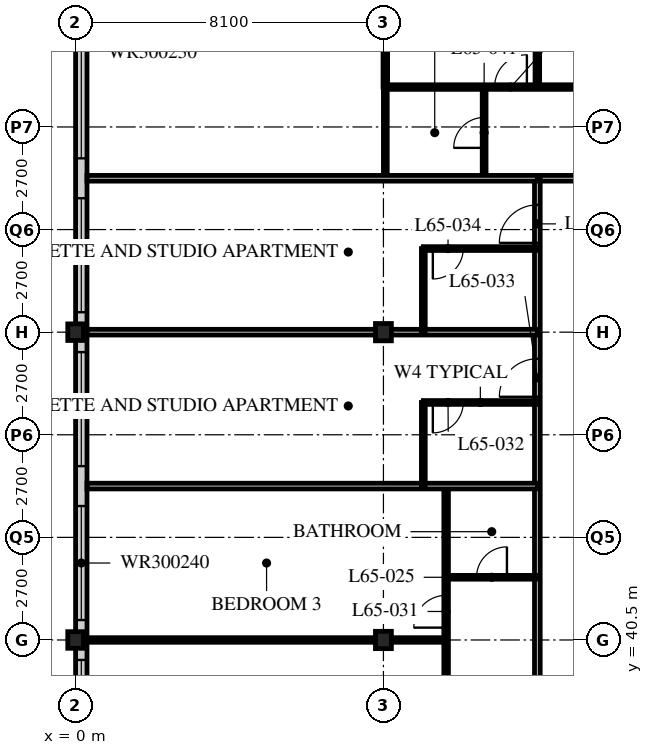
"""IFC4 building model, lengths in metres.
Left out: names, types, materials, properties, quantities, classifications, styles, units other than length and angle.
Written with IfcOpenShell. Run it as: python <this file> out.ifc"""

import sys

from ifc_helpers import new_model, si_unit, direction, frame, frame_2d, origin, origin_2d, place, context, subcontext, project, spatial, rectangle, i_section, extrude, element, fill, save


model = new_model("IFC4")
c1 = context("Model", 3, precision=1e-05, world=origin(), true_north=direction((0.0, 1.0)))
c2 = subcontext(c1, "Body", "Model", "MODEL_VIEW")
j1 = project(units=[si_unit("LENGTHUNIT", "METRE"), si_unit("PLANEANGLEUNIT", "RADIAN")], contexts=[c1])
p1 = place(None, origin())
s1 = spatial("IfcSite", under=j1, at=p1, CompositionType="ELEMENT")
p2 = place(p1, origin())
s2 = spatial("IfcBuilding", under=s1, at=p2, CompositionType="ELEMENT")
p3 = place(p2, frame((0.0, 0.0, 254.1)))
s3 = spatial("IfcBuildingStorey", under=s2, at=p3, CompositionType="ELEMENT", Elevation=254.1)
for number, where, z_axis, x_axis in (
    (1, (0.0, 40.5, 0.0), (0.0, 0.0, 1.0), (1.0, 0.0, 0.0)),
    (2, (0.0, 48.6, 0.0), (0.0, 0.0, 1.0), (1.0, 0.0, 0.0)),
):
    element("IfcColumn", number, at=place(p3, frame(where, z_axis=z_axis, x_axis=x_axis)), inside=s3, PredefinedType="COLUMN", context=c2, shape_type="SweptSolid", body=[
        extrude(i_section(OverallWidth=0.412, OverallDepth=0.437, WebThickness=0.036, FlangeThickness=0.058, FilletRadius=0.015, at=origin_2d()), origin(), (0.0, 0.0, 1.0), 3.9),
    ])
for number, where, z_axis, x_axis in (
    (3, (8.1, 40.5, 0.0), (0.0, 0.0, 1.0), (1.0, 0.0, 0.0)),
    (4, (8.1, 48.6, 0.0), (0.0, 0.0, 1.0), (1.0, 0.0, 0.0)),
):
    element("IfcColumn", number, at=place(p3, frame(where, z_axis=z_axis, x_axis=x_axis)), inside=s3, PredefinedType="COLUMN", context=c2, shape_type="SweptSolid", body=[
        extrude(i_section(OverallWidth=0.418, OverallDepth=0.456, WebThickness=0.042, FlangeThickness=0.067, FilletRadius=0.015, at=origin_2d()), origin(), (0.0, 0.0, 1.0), 3.9),
    ])
p4 = place(p3, frame((0.15, 56.4, 0.0), z_axis=(0.0, 0.0, 1.0), x_axis=(0.0, -1.0, 0.0)))
e5 = element("IfcWall", 5, at=p4, inside=s3, PredefinedType="SOLIDWALL", context=c2, shape_type="SweptSolid", body=[
    extrude(rectangle(XDim=32.1, YDim=0.3, at=frame_2d((16.05, 0.0))), origin(), (0.0, 0.0, 1.0), 3.69),
])
p5 = place(p4, frame((0.225, 0.0, 0.6)))
e6 = element("IfcOpeningElement", 6, at=p5, cuts=e5, PredefinedType="OPENING", context=c2, shape_type="SweptSolid", body=[
    extrude(rectangle(XDim=3.0, YDim=2.4, at=frame_2d((1.5, 1.2))), frame((0.0, 0.16, 0.0), z_axis=(0.0, -1.0, 0.0), x_axis=(1.0, 0.0, 0.0)), (0.0, 0.0, 1.0), 0.32),
])
p6 = place(p4, frame((4.275, 0.0, 0.6)))
e7 = element("IfcOpeningElement", 7, at=p6, cuts=e5, PredefinedType="OPENING", context=c2, shape_type="SweptSolid", body=[
    extrude(rectangle(XDim=3.0, YDim=2.4, at=frame_2d((1.5, 1.2))), frame((0.0, 0.16, 0.0), z_axis=(0.0, -1.0, 0.0), x_axis=(1.0, 0.0, 0.0)), (0.0, 0.0, 1.0), 0.32),
])
p7 = place(p4, frame((8.325, 0.0, 0.6)))
e8 = element("IfcOpeningElement", 8, at=p7, cuts=e5, PredefinedType="OPENING", context=c2, shape_type="SweptSolid", body=[
    extrude(rectangle(XDim=3.0, YDim=2.4, at=frame_2d((1.5, 1.2))), frame((0.0, 0.16, 0.0), z_axis=(0.0, -1.0, 0.0), x_axis=(1.0, 0.0, 0.0)), (0.0, 0.0, 1.0), 0.32),
])
p8 = place(p4, frame((12.375, 0.0, 0.6)))
e9 = element("IfcOpeningElement", 9, at=p8, cuts=e5, PredefinedType="OPENING", context=c2, shape_type="SweptSolid", body=[
    extrude(rectangle(XDim=3.0, YDim=2.4, at=frame_2d((1.5, 1.2))), frame((0.0, 0.16, 0.0), z_axis=(0.0, -1.0, 0.0), x_axis=(1.0, 0.0, 0.0)), (0.0, 0.0, 1.0), 0.32),
])
p9 = place(p4, frame((16.425, 0.0, 0.6)))
e10 = element("IfcOpeningElement", 10, at=p9, cuts=e5, PredefinedType="OPENING", context=c2, shape_type="SweptSolid", body=[
    extrude(rectangle(XDim=3.0, YDim=2.4, at=frame_2d((1.5, 1.2))), frame((0.0, 0.16, 0.0), z_axis=(0.0, -1.0, 0.0), x_axis=(1.0, 0.0, 0.0)), (0.0, 0.0, 1.0), 0.32),
])
p10 = place(p4, frame((20.475, 0.0, 0.6)))
e11 = element("IfcOpeningElement", 11, at=p10, cuts=e5, PredefinedType="OPENING", context=c2, shape_type="SweptSolid", body=[
    extrude(rectangle(XDim=3.0, YDim=2.4, at=frame_2d((1.5, 1.2))), frame((0.0, 0.16, 0.0), z_axis=(0.0, -1.0, 0.0), x_axis=(1.0, 0.0, 0.0)), (0.0, 0.0, 1.0), 0.32),
])
p11 = place(p4, frame((24.525, 0.0, 0.6)))
e12 = element("IfcOpeningElement", 12, at=p11, cuts=e5, PredefinedType="OPENING", context=c2, shape_type="SweptSolid", body=[
    extrude(rectangle(XDim=3.0, YDim=2.4, at=frame_2d((1.5, 1.2))), frame((0.0, 0.16, 0.0), z_axis=(0.0, -1.0, 0.0), x_axis=(1.0, 0.0, 0.0)), (0.0, 0.0, 1.0), 0.32),
])
p12 = place(p4, frame((28.575, 0.0, 0.6)))
e13 = element("IfcOpeningElement", 13, at=p12, cuts=e5, PredefinedType="OPENING", context=c2, shape_type="SweptSolid", body=[
    extrude(rectangle(XDim=3.0, YDim=2.4, at=frame_2d((1.5, 1.2))), frame((0.0, 0.16, 0.0), z_axis=(0.0, -1.0, 0.0), x_axis=(1.0, 0.0, 0.0)), (0.0, 0.0, 1.0), 0.32),
])
p13 = place(p3, frame((12.15, 52.65, 0.0), z_axis=(0.0, 0.0, 1.0), x_axis=(1.0, 0.0, 0.0)))
e14 = element("IfcWall", 14, at=p13, inside=s3, PredefinedType="PARTITIONING", context=c2, shape_type="SweptSolid", body=[
    extrude(rectangle(XDim=24.3, YDim=0.15, at=frame_2d((12.15, 0.0))), origin(), (0.0, 0.0, 1.0), 3.69),
])
p14 = place(p13, frame((4.45, 0.0, 0.0)))
e15 = element("IfcOpeningElement", 15, at=p14, cuts=e14, PredefinedType="OPENING", context=c2, shape_type="SweptSolid", body=[
    extrude(rectangle(XDim=1.0, YDim=2.1, at=frame_2d((0.5, 1.05))), frame((0.0, 0.085, 0.0), z_axis=(0.0, -1.0, 0.0), x_axis=(1.0, 0.0, 0.0)), (0.0, 0.0, 1.0), 0.17),
])
p15 = place(p13, frame((1.525, 0.0, 0.0)))
e16 = element("IfcOpeningElement", 16, at=p15, cuts=e14, PredefinedType="OPENING", context=c2, shape_type="SweptSolid", body=[
    extrude(rectangle(XDim=1.0, YDim=2.1, at=frame_2d((0.5, 1.05))), frame((0.0, 0.085, 0.0), z_axis=(0.0, -1.0, 0.0), x_axis=(1.0, 0.0, 0.0)), (0.0, 0.0, 1.0), 0.17),
])
p16 = place(p3, frame((12.15, 22.5, 0.0), z_axis=(0.0, 0.0, 1.0), x_axis=(0.0, 1.0, 0.0)))
e17 = element("IfcWall", 17, at=p16, inside=s3, PredefinedType="PARTITIONING", context=c2, shape_type="SweptSolid", body=[
    extrude(rectangle(XDim=30.15, YDim=0.15, at=frame_2d((15.075, 0.0))), origin(), (0.0, 0.0, 1.0), 3.69),
])
p17 = place(p16, frame((0.4, 0.0, 0.0)))
e18 = element("IfcOpeningElement", 18, at=p17, cuts=e17, PredefinedType="OPENING", context=c2, shape_type="SweptSolid", body=[
    extrude(rectangle(XDim=1.0, YDim=2.1, at=frame_2d((0.5, 1.05))), frame((0.0, 0.085, 0.0), z_axis=(0.0, -1.0, 0.0), x_axis=(1.0, 0.0, 0.0)), (0.0, 0.0, 1.0), 0.17),
])
p18 = place(p16, frame((24.4, 0.0, 0.0)))
e19 = element("IfcOpeningElement", 19, at=p18, cuts=e17, PredefinedType="OPENING", context=c2, shape_type="SweptSolid", body=[
    extrude(rectangle(XDim=1.0, YDim=2.1, at=frame_2d((0.5, 1.05))), frame((0.0, 0.085, 0.0), z_axis=(0.0, -1.0, 0.0), x_axis=(1.0, 0.0, 0.0)), (0.0, 0.0, 1.0), 0.17),
])
p19 = place(p16, frame((28.45, 0.0, 0.0)))
e20 = element("IfcOpeningElement", 20, at=p19, cuts=e17, PredefinedType="OPENING", context=c2, shape_type="SweptSolid", body=[
    extrude(rectangle(XDim=1.0, YDim=2.1, at=frame_2d((0.5, 1.05))), frame((0.0, 0.085, 0.0), z_axis=(0.0, -1.0, 0.0), x_axis=(1.0, 0.0, 0.0)), (0.0, 0.0, 1.0), 0.17),
])
p20 = place(p3, frame((9.75, 22.5, 0.0), z_axis=(0.0, 0.0, 1.0), x_axis=(0.0, 1.0, 0.0)))
e21 = element("IfcWall", 21, at=p20, inside=s3, PredefinedType="PARTITIONING", context=c2, shape_type="SweptSolid", body=[
    extrude(rectangle(XDim=22.05, YDim=0.12, at=frame_2d((11.025, 0.0))), origin(), (0.0, 0.0, 1.0), 3.69),
])
p21 = place(p20, frame((0.975, 0.0, 0.0)))
e22 = element("IfcOpeningElement", 22, at=p21, cuts=e21, PredefinedType="OPENING", context=c2, shape_type="SweptSolid", body=[
    extrude(rectangle(XDim=0.85, YDim=2.1, at=frame_2d((0.425, 1.05))), frame((0.0, 0.07, 0.0), z_axis=(0.0, -1.0, 0.0), x_axis=(1.0, 0.0, 0.0)), (0.0, 0.0, 1.0), 0.14),
])
p22 = place(p20, frame((10.225, 0.0, 0.0)))
e23 = element("IfcOpeningElement", 23, at=p22, cuts=e21, PredefinedType="OPENING", context=c2, shape_type="SweptSolid", body=[
    extrude(rectangle(XDim=0.85, YDim=2.1, at=frame_2d((0.425, 1.05))), frame((0.0, 0.07, 0.0), z_axis=(0.0, -1.0, 0.0), x_axis=(1.0, 0.0, 0.0)), (0.0, 0.0, 1.0), 0.14),
])
p23 = place(p20, frame((14.275, 0.0, 0.0)))
e24 = element("IfcOpeningElement", 24, at=p23, cuts=e21, PredefinedType="OPENING", context=c2, shape_type="SweptSolid", body=[
    extrude(rectangle(XDim=0.85, YDim=2.1, at=frame_2d((0.425, 1.05))), frame((0.0, 0.07, 0.0), z_axis=(0.0, -1.0, 0.0), x_axis=(1.0, 0.0, 0.0)), (0.0, 0.0, 1.0), 0.14),
])
p24 = place(p20, frame((18.325, 0.0, 0.0)))
e25 = element("IfcOpeningElement", 25, at=p24, cuts=e21, PredefinedType="OPENING", context=c2, shape_type="SweptSolid", body=[
    extrude(rectangle(XDim=0.85, YDim=2.1, at=frame_2d((0.425, 1.05))), frame((0.0, 0.07, 0.0), z_axis=(0.0, -1.0, 0.0), x_axis=(1.0, 0.0, 0.0)), (0.0, 0.0, 1.0), 0.14),
])
p25 = place(p3, frame((12.15, 42.15, 0.0), z_axis=(0.0, 0.0, 1.0), x_axis=(-1.0, 0.0, 0.0)))
e26 = element("IfcWall", 26, at=p25, inside=s3, PredefinedType="PARTITIONING", context=c2, shape_type="SweptSolid", body=[
    extrude(rectangle(XDim=2.4, YDim=0.1, at=frame_2d((1.2, 0.0))), origin(), (0.0, 0.0, 1.0), 3.69),
])
p26 = place(p25, frame((0.8, 0.0, 0.0)))
e27 = element("IfcOpeningElement", 27, at=p26, cuts=e26, PredefinedType="OPENING", context=c2, shape_type="SweptSolid", body=[
    extrude(rectangle(XDim=0.8, YDim=2.1, at=frame_2d((0.4, 1.05))), frame((0.0, 0.06, 0.0), z_axis=(0.0, -1.0, 0.0), x_axis=(1.0, 0.0, 0.0)), (0.0, 0.0, 1.0), 0.12),
])
p27 = place(p3, frame((9.75, 40.5, 0.0), z_axis=(0.0, 0.0, 1.0), x_axis=(-1.0, 0.0, 0.0)))
e28 = element("IfcWall", 28, at=p27, inside=s3, PredefinedType="PARTITIONING", context=c2, shape_type="SweptSolid", body=[
    extrude(rectangle(XDim=9.45, YDim=0.12, at=frame_2d((4.725, 0.0))), origin(), (0.0, 0.0, 1.0), 3.078),
])
p28 = place(p3, frame((12.15, 44.55, 0.0), z_axis=(0.0, 0.0, 1.0), x_axis=(-1.0, 0.0, 0.0)))
e29 = element("IfcWall", 29, at=p28, inside=s3, PredefinedType="PARTITIONING", context=c2, shape_type="SweptSolid", body=[
    extrude(rectangle(XDim=11.85, YDim=0.15, at=frame_2d((5.925, 0.0))), origin(), (0.0, 0.0, 1.0), 3.69),
])
p29 = place(p3, frame((9.15, 44.55, 0.0), z_axis=(0.0, 0.0, 1.0), x_axis=(0.0, 1.0, 0.0)))
e30 = element("IfcWall", 30, at=p29, inside=s3, PredefinedType="PARTITIONING", context=c2, shape_type="SweptSolid", body=[
    extrude(rectangle(XDim=2.2, YDim=0.1, at=frame_2d((1.1, 0.0))), origin(), (0.0, 0.0, 1.0), 3.69),
])
p30 = place(p3, frame((12.15, 46.75, 0.0), z_axis=(0.0, 0.0, 1.0), x_axis=(-1.0, 0.0, 0.0)))
e31 = element("IfcWall", 31, at=p30, inside=s3, PredefinedType="PARTITIONING", context=c2, shape_type="SweptSolid", body=[
    extrude(rectangle(XDim=3.0, YDim=0.1, at=frame_2d((1.5, 0.0))), origin(), (0.0, 0.0, 1.0), 3.69),
])
p31 = place(p30, frame((1.95, 0.0, 0.0)))
e32 = element("IfcOpeningElement", 32, at=p31, cuts=e31, PredefinedType="OPENING", context=c2, shape_type="SweptSolid", body=[
    extrude(rectangle(XDim=0.8, YDim=2.1, at=frame_2d((0.4, 1.05))), frame((0.0, 0.06, 0.0), z_axis=(0.0, -1.0, 0.0), x_axis=(1.0, 0.0, 0.0)), (0.0, 0.0, 1.0), 0.12),
])
p32 = place(p3, frame((12.15, 48.6, 0.0), z_axis=(0.0, 0.0, 1.0), x_axis=(-1.0, 0.0, 0.0)))
e33 = element("IfcWall", 33, at=p32, inside=s3, PredefinedType="PARTITIONING", context=c2, shape_type="SweptSolid", body=[
    extrude(rectangle(XDim=11.85, YDim=0.15, at=frame_2d((5.925, 0.0))), origin(), (0.0, 0.0, 1.0), 3.078),
])
p33 = place(p3, frame((9.15, 48.6, 0.0), z_axis=(0.0, 0.0, 1.0), x_axis=(0.0, 1.0, 0.0)))
e34 = element("IfcWall", 34, at=p33, inside=s3, PredefinedType="PARTITIONING", context=c2, shape_type="SweptSolid", body=[
    extrude(rectangle(XDim=2.2, YDim=0.1, at=frame_2d((1.1, 0.0))), origin(), (0.0, 0.0, 1.0), 3.69),
])
p34 = place(p3, frame((12.15, 50.8, 0.0), z_axis=(0.0, 0.0, 1.0), x_axis=(-1.0, 0.0, 0.0)))
e35 = element("IfcWall", 35, at=p34, inside=s3, PredefinedType="PARTITIONING", context=c2, shape_type="SweptSolid", body=[
    extrude(rectangle(XDim=3.0, YDim=0.1, at=frame_2d((1.5, 0.0))), origin(), (0.0, 0.0, 1.0), 3.69),
])
p35 = place(p34, frame((1.95, 0.0, 0.0)))
e36 = element("IfcOpeningElement", 36, at=p35, cuts=e35, PredefinedType="OPENING", context=c2, shape_type="SweptSolid", body=[
    extrude(rectangle(XDim=0.8, YDim=2.1, at=frame_2d((0.4, 1.05))), frame((0.0, 0.06, 0.0), z_axis=(0.0, -1.0, 0.0), x_axis=(1.0, 0.0, 0.0)), (0.0, 0.0, 1.0), 0.12),
])
p36 = place(p3, frame((10.75, 52.65, 0.0), z_axis=(0.0, 0.0, 1.0), x_axis=(0.0, 1.0, 0.0)))
e37 = element("IfcWall", 37, at=p36, inside=s3, PredefinedType="PARTITIONING", context=c2, shape_type="SweptSolid", body=[
    extrude(rectangle(XDim=2.4, YDim=0.1, at=frame_2d((1.2, 0.0))), origin(), (0.0, 0.0, 1.0), 3.69),
])
p37 = place(p36, frame((0.8, 0.0, 0.0)))
e38 = element("IfcOpeningElement", 38, at=p37, cuts=e37, PredefinedType="OPENING", context=c2, shape_type="SweptSolid", body=[
    extrude(rectangle(XDim=0.8, YDim=2.1, at=frame_2d((0.4, 1.05))), frame((0.0, 0.06, 0.0), z_axis=(0.0, -1.0, 0.0), x_axis=(1.0, 0.0, 0.0)), (0.0, 0.0, 1.0), 0.12),
])
p38 = place(p3, frame((8.15, 52.65, 0.0), z_axis=(0.0, 0.0, 1.0), x_axis=(0.0, 1.0, 0.0)))
e39 = element("IfcWall", 39, at=p38, inside=s3, PredefinedType="PARTITIONING", context=c2, shape_type="SweptSolid", body=[
    extrude(rectangle(XDim=2.4, YDim=0.1, at=frame_2d((1.2, 0.0))), origin(), (0.0, 0.0, 1.0), 3.078),
])
p39 = place(p3, frame((8.15, 55.05, 0.0), z_axis=(0.0, 0.0, 1.0), x_axis=(1.0, 0.0, 0.0)))
e40 = element("IfcWall", 40, at=p39, inside=s3, PredefinedType="PARTITIONING", context=c2, shape_type="SweptSolid", body=[
    extrude(rectangle(XDim=28.3, YDim=0.12, at=frame_2d((14.15, 0.0))), origin(), (0.0, 0.0, 1.0), 3.69),
])
p40 = place(p39, frame((9.025, 0.0, 0.0)))
e41 = element("IfcOpeningElement", 41, at=p40, cuts=e40, PredefinedType="OPENING", context=c2, shape_type="SweptSolid", body=[
    extrude(rectangle(XDim=0.85, YDim=2.1, at=frame_2d((0.425, 1.05))), frame((0.0, 0.07, 0.0), z_axis=(0.0, -1.0, 0.0), x_axis=(1.0, 0.0, 0.0)), (0.0, 0.0, 1.0), 0.14),
])
p41 = place(p39, frame((16.475, 0.0, 0.0)))
e42 = element("IfcOpeningElement", 42, at=p41, cuts=e40, PredefinedType="OPENING", context=c2, shape_type="SweptSolid", body=[
    extrude(rectangle(XDim=0.85, YDim=2.1, at=frame_2d((0.425, 1.05))), frame((0.0, 0.07, 0.0), z_axis=(0.0, -1.0, 0.0), x_axis=(1.0, 0.0, 0.0)), (0.0, 0.0, 1.0), 0.14),
])
p42 = place(p39, frame((20.525, 0.0, 0.0)))
e43 = element("IfcOpeningElement", 43, at=p42, cuts=e40, PredefinedType="OPENING", context=c2, shape_type="SweptSolid", body=[
    extrude(rectangle(XDim=0.85, YDim=2.1, at=frame_2d((0.425, 1.05))), frame((0.0, 0.07, 0.0), z_axis=(0.0, -1.0, 0.0), x_axis=(1.0, 0.0, 0.0)), (0.0, 0.0, 1.0), 0.14),
])
p43 = place(p39, frame((24.575, 0.0, 0.0)))
e44 = element("IfcOpeningElement", 44, at=p43, cuts=e40, PredefinedType="OPENING", context=c2, shape_type="SweptSolid", body=[
    extrude(rectangle(XDim=0.85, YDim=2.1, at=frame_2d((0.425, 1.05))), frame((0.0, 0.07, 0.0), z_axis=(0.0, -1.0, 0.0), x_axis=(1.0, 0.0, 0.0)), (0.0, 0.0, 1.0), 0.14),
])
p44 = place(p39, frame((6.725, 0.0, 0.0)))
e45 = element("IfcOpeningElement", 45, at=p44, cuts=e40, PredefinedType="OPENING", context=c2, shape_type="SweptSolid", body=[
    extrude(rectangle(XDim=0.85, YDim=2.1, at=frame_2d((0.425, 1.05))), frame((0.0, 0.07, 0.0), z_axis=(0.0, -1.0, 0.0), x_axis=(1.0, 0.0, 0.0)), (0.0, 0.0, 1.0), 0.14),
])
p45 = place(p39, frame((2.875, 0.0, 0.0)))
e46 = element("IfcOpeningElement", 46, at=p45, cuts=e40, PredefinedType="OPENING", context=c2, shape_type="SweptSolid", body=[
    extrude(rectangle(XDim=0.85, YDim=2.1, at=frame_2d((0.425, 1.05))), frame((0.0, 0.07, 0.0), z_axis=(0.0, -1.0, 0.0), x_axis=(1.0, 0.0, 0.0)), (0.0, 0.0, 1.0), 0.14),
])
p46 = place(p3, frame((12.15, 55.05, 0.0), z_axis=(0.0, 0.0, 1.0), x_axis=(0.0, 1.0, 0.0)))
e47 = element("IfcWall", 47, at=p46, inside=s3, PredefinedType="PARTITIONING", context=c2, shape_type="SweptSolid", body=[
    extrude(rectangle(XDim=9.45, YDim=0.12, at=frame_2d((4.725, 0.0))), origin(), (0.0, 0.0, 1.0), 3.69),
])
p47 = place(p3, frame((0.3, 52.65, 0.0), z_axis=(0.0, 0.0, 1.0), x_axis=(1.0, 0.0, 0.0)))
e48 = element("IfcWall", 48, at=p47, inside=s3, PredefinedType="PARTITIONING", context=c2, shape_type="SweptSolid", body=[
    extrude(rectangle(XDim=11.85, YDim=0.15, at=frame_2d((5.925, 0.0))), origin(), (0.0, 0.0, 1.0), 3.69),
])
p48 = place(p3, frame((8.15, 55.05, 0.0), z_axis=(0.0, 0.0, 1.0), x_axis=(0.0, 1.0, 0.0)))
e49 = element("IfcWall", 49, at=p48, inside=s3, PredefinedType="PARTITIONING", context=c2, shape_type="SweptSolid", body=[
    extrude(rectangle(XDim=1.447, YDim=0.12, at=frame_2d((0.724, 0.0))), origin(), (0.0, 0.0, 1.0), 3.078),
])
p49 = place(p5, origin())
e50 = element("IfcWindow", 50, at=p49, inside=s3, PartitioningType="SINGLE_PANEL", PredefinedType="WINDOW", context=c2, shape_type="SweptSolid", body=[
    extrude(rectangle(XDim=3.0, YDim=2.4, at=frame_2d((1.5, 1.2))), frame((0.0, 0.03, 0.0), z_axis=(0.0, -1.0, 0.0), x_axis=(1.0, 0.0, 0.0)), (0.0, 0.0, 1.0), 0.06),
])
fill(e6, e50)
p50 = place(p6, origin())
e51 = element("IfcWindow", 51, at=p50, inside=s3, PartitioningType="SINGLE_PANEL", PredefinedType="WINDOW", context=c2, shape_type="SweptSolid", body=[
    extrude(rectangle(XDim=3.0, YDim=2.4, at=frame_2d((1.5, 1.2))), frame((0.0, 0.03, 0.0), z_axis=(0.0, -1.0, 0.0), x_axis=(1.0, 0.0, 0.0)), (0.0, 0.0, 1.0), 0.06),
])
fill(e7, e51)
p51 = place(p7, origin())
e52 = element("IfcWindow", 52, at=p51, inside=s3, PartitioningType="SINGLE_PANEL", PredefinedType="WINDOW", context=c2, shape_type="SweptSolid", body=[
    extrude(rectangle(XDim=3.0, YDim=2.4, at=frame_2d((1.5, 1.2))), frame((0.0, 0.03, 0.0), z_axis=(0.0, -1.0, 0.0), x_axis=(1.0, 0.0, 0.0)), (0.0, 0.0, 1.0), 0.06),
])
fill(e8, e52)
p52 = place(p8, origin())
e53 = element("IfcWindow", 53, at=p52, inside=s3, PartitioningType="SINGLE_PANEL", PredefinedType="WINDOW", context=c2, shape_type="SweptSolid", body=[
    extrude(rectangle(XDim=3.0, YDim=2.4, at=frame_2d((1.5, 1.2))), frame((0.0, 0.03, 0.0), z_axis=(0.0, -1.0, 0.0), x_axis=(1.0, 0.0, 0.0)), (0.0, 0.0, 1.0), 0.06),
])
fill(e9, e53)
p53 = place(p9, origin())
e54 = element("IfcWindow", 54, at=p53, inside=s3, PartitioningType="SINGLE_PANEL", PredefinedType="WINDOW", context=c2, shape_type="SweptSolid", body=[
    extrude(rectangle(XDim=3.0, YDim=2.4, at=frame_2d((1.5, 1.2))), frame((0.0, 0.03, 0.0), z_axis=(0.0, -1.0, 0.0), x_axis=(1.0, 0.0, 0.0)), (0.0, 0.0, 1.0), 0.06),
])
fill(e10, e54)
p54 = place(p26, origin())
e55 = element("IfcDoor", 55, at=p54, inside=s3, OperationType="SINGLE_SWING_RIGHT", PredefinedType="DOOR", context=c2, shape_type="SweptSolid", body=[
    extrude(rectangle(XDim=0.8, YDim=2.1, at=frame_2d((0.4, 1.05))), frame((0.0, 0.025, 0.0), z_axis=(0.0, -1.0, 0.0), x_axis=(1.0, 0.0, 0.0)), (0.0, 0.0, 1.0), 0.05),
])
fill(e27, e55)
p55 = place(p24, origin())
e56 = element("IfcDoor", 56, at=p55, inside=s3, OperationType="SINGLE_SWING_LEFT", PredefinedType="DOOR", context=c2, shape_type="SweptSolid", body=[
    extrude(rectangle(XDim=0.85, YDim=2.1, at=frame_2d((0.425, 1.05))), frame((0.0, 0.025, 0.0), z_axis=(0.0, -1.0, 0.0), x_axis=(1.0, 0.0, 0.0)), (0.0, 0.0, 1.0), 0.05),
])
fill(e25, e56)
p56 = place(p31, origin())
e57 = element("IfcDoor", 57, at=p56, inside=s3, OperationType="SINGLE_SWING_RIGHT", PredefinedType="DOOR", context=c2, shape_type="SweptSolid", body=[
    extrude(rectangle(XDim=0.8, YDim=2.1, at=frame_2d((0.4, 1.05))), frame((0.0, 0.025, 0.0), z_axis=(0.0, -1.0, 0.0), x_axis=(1.0, 0.0, 0.0)), (0.0, 0.0, 1.0), 0.05),
])
fill(e32, e57)
p57 = place(p18, origin())
e58 = element("IfcDoor", 58, at=p57, inside=s3, OperationType="SINGLE_SWING_LEFT", PredefinedType="DOOR", context=c2, shape_type="SweptSolid", body=[
    extrude(rectangle(XDim=1.0, YDim=2.1, at=frame_2d((0.5, 1.05))), frame((0.0, 0.025, 0.0), z_axis=(0.0, -1.0, 0.0), x_axis=(1.0, 0.0, 0.0)), (0.0, 0.0, 1.0), 0.05),
])
fill(e19, e58)
p58 = place(p35, origin())
e59 = element("IfcDoor", 59, at=p58, inside=s3, OperationType="SINGLE_SWING_RIGHT", PredefinedType="DOOR", context=c2, shape_type="SweptSolid", body=[
    extrude(rectangle(XDim=0.8, YDim=2.1, at=frame_2d((0.4, 1.05))), frame((0.0, 0.025, 0.0), z_axis=(0.0, -1.0, 0.0), x_axis=(1.0, 0.0, 0.0)), (0.0, 0.0, 1.0), 0.05),
])
fill(e36, e59)
p59 = place(p19, origin())
e60 = element("IfcDoor", 60, at=p59, inside=s3, OperationType="SINGLE_SWING_LEFT", PredefinedType="DOOR", context=c2, shape_type="SweptSolid", body=[
    extrude(rectangle(XDim=1.0, YDim=2.1, at=frame_2d((0.5, 1.05))), frame((0.0, 0.025, 0.0), z_axis=(0.0, -1.0, 0.0), x_axis=(1.0, 0.0, 0.0)), (0.0, 0.0, 1.0), 0.05),
])
fill(e20, e60)
p60 = place(p37, origin())
e61 = element("IfcDoor", 61, at=p60, inside=s3, OperationType="SINGLE_SWING_LEFT", PredefinedType="DOOR", context=c2, shape_type="SweptSolid", body=[
    extrude(rectangle(XDim=0.8, YDim=2.1, at=frame_2d((0.4, 1.05))), frame((0.0, 0.025, 0.0), z_axis=(0.0, -1.0, 0.0), x_axis=(1.0, 0.0, 0.0)), (0.0, 0.0, 1.0), 0.05),
])
fill(e38, e61)
p61 = place(p45, origin())
e62 = element("IfcDoor", 62, at=p61, inside=s3, OperationType="SINGLE_SWING_RIGHT", PredefinedType="DOOR", context=c2, shape_type="SweptSolid", body=[
    extrude(rectangle(XDim=0.85, YDim=2.1, at=frame_2d((0.425, 1.05))), frame((0.0, 0.025, 0.0), z_axis=(0.0, -1.0, 0.0), x_axis=(1.0, 0.0, 0.0)), (0.0, 0.0, 1.0), 0.05),
])
fill(e46, e62)
save(model, sys.argv[1])
